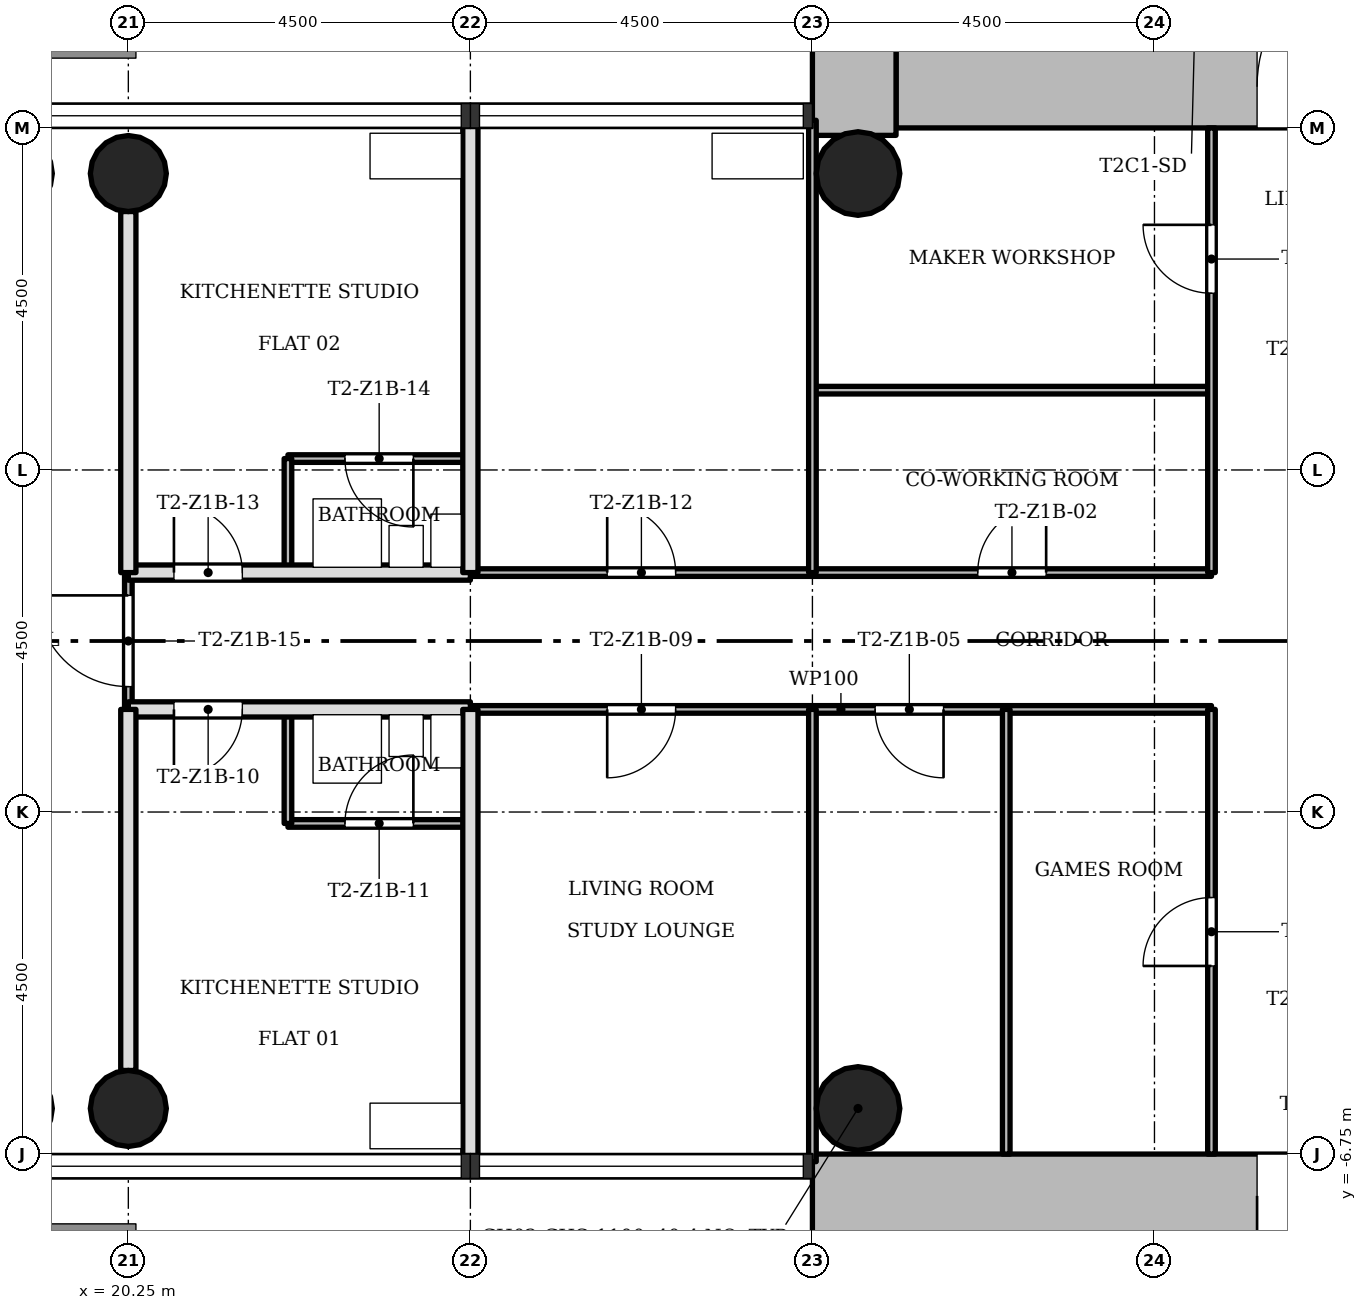
"""IFC4 building model, lengths in metres.
Left out: names, types, materials, properties, quantities, classifications, styles, units other than length and angle.
Written with IfcOpenShell. Run it as: python <this file> out.ifc"""

import sys

from ifc_helpers import new_model, si_unit, direction, frame, frame_2d, origin, origin_2d, place, context, subcontext, project, spatial, rectangle, hollow_circle, extrude, element, fill, save


model = new_model("IFC4")
c1 = context("Model", 3, precision=1e-05, world=origin(), true_north=direction((0.0, 1.0)))
c2 = subcontext(c1, "Body", "Model", "MODEL_VIEW")
j1 = project(units=[si_unit("LENGTHUNIT", "METRE"), si_unit("PLANEANGLEUNIT", "RADIAN")], contexts=[c1])
p1 = place(None, origin())
s1 = spatial("IfcSite", under=j1, at=p1, CompositionType="ELEMENT")
p2 = place(p1, origin())
s2 = spatial("IfcBuilding", under=s1, at=p2, CompositionType="ELEMENT")
p3 = place(p2, frame((0.0, 0.0, 38.1)))
s3 = spatial("IfcBuildingStorey", under=s2, at=p3, CompositionType="ELEMENT", Elevation=38.1)
p4 = place(p3, frame((30.35, 7.3, 0.0), z_axis=(0.0, 0.0, 1.0), x_axis=(1.0, 0.0, 0.0)))
e1 = element("IfcWall", 1, at=p4, inside=s3, PredefinedType="SHEAR", context=c2, shape_type="SweptSolid", body=[
    extrude(rectangle(XDim=12.4, YDim=1.1, at=frame_2d((6.2, 0.0))), origin(), (0.0, 0.0, 1.0), 3.4),
])
p5 = place(p4, frame((4.75, 0.0, 0.0)))
e2 = element("IfcOpeningElement", 2, at=p5, cuts=e1, PredefinedType="OPENING", context=c2, shape_type="SweptSolid", body=[
    extrude(rectangle(XDim=1.8, YDim=2.1, at=frame_2d((0.9, 1.05))), frame((0.0, 0.56, 0.0), z_axis=(0.0, -1.0, 0.0), x_axis=(1.0, 0.0, 0.0)), (0.0, 0.0, 1.0), 1.12),
])
p6 = place(p3, frame((29.8, 15.248, 0.0), z_axis=(0.0, 0.0, 1.0), x_axis=(0.0, -1.0, 0.0)))
e3 = element("IfcWall", 3, at=p6, inside=s3, PredefinedType="SHEAR", context=c2, shape_type="SweptSolid", body=[
    extrude(rectangle(XDim=8.596, YDim=1.1, at=frame_2d((4.298, 0.0))), origin(), (0.0, 0.0, 1.0), 3.4),
])
p7 = place(p3, frame((41.65, -7.3, 0.0), z_axis=(0.0, 0.0, 1.0), x_axis=(-1.0, 0.0, 0.0)))
e4 = element("IfcWall", 4, at=p7, inside=s3, PredefinedType="SHEAR", context=c2, shape_type="SweptSolid", body=[
    extrude(rectangle(XDim=12.4, YDim=1.1, at=frame_2d((6.2, 0.0))), origin(), (0.0, 0.0, 1.0), 3.4),
])
p8 = place(p7, frame((4.75, 0.0, 0.0)))
e5 = element("IfcOpeningElement", 5, at=p8, cuts=e4, PredefinedType="OPENING", context=c2, shape_type="SweptSolid", body=[
    extrude(rectangle(XDim=1.8, YDim=2.1, at=frame_2d((0.9, 1.05))), frame((0.0, 0.56, 0.0), z_axis=(0.0, -1.0, 0.0), x_axis=(1.0, 0.0, 0.0)), (0.0, 0.0, 1.0), 1.12),
])
for number, where, z_axis, x_axis in (
    (6, (20.25, 6.15, 0.0), (0.0, 0.0, 1.0), (1.0, 0.0, 0.0)),
    (7, (20.25, -6.15, 0.0), (0.0, 0.0, 1.0), (1.0, 0.0, 0.0)),
):
    element("IfcColumn", number, at=place(p3, frame(where, z_axis=z_axis, x_axis=x_axis)), inside=s3, PredefinedType="COLUMN", context=c2, shape_type="SweptSolid", body=[
        extrude(hollow_circle(Radius=0.5, WallThickness=0.036, at=origin_2d()), origin(), (0.0, 0.0, 1.0), 3.4),
    ])
for number, where, z_axis, x_axis in (
    (8, (29.85, 6.15, 0.0), (0.0, 0.0, 1.0), (1.0, 0.0, 0.0)),
    (9, (29.85, -6.15, 0.0), (0.0, 0.0, 1.0), (1.0, 0.0, 0.0)),
):
    element("IfcColumn", number, at=place(p3, frame(where, z_axis=z_axis, x_axis=x_axis)), inside=s3, PredefinedType="COLUMN", context=c2, shape_type="SweptSolid", body=[
        extrude(hollow_circle(Radius=0.55, WallThickness=0.04, at=origin_2d()), origin(), (0.0, 0.0, 1.0), 3.4),
    ])
p9 = place(p3, frame((24.75, -2.4, 0.0), z_axis=(0.0, 0.0, 1.0), x_axis=(-1.0, 0.0, 0.0)))
e10 = element("IfcWall", 10, at=p9, inside=s3, PredefinedType="PARTITIONING", context=c2, shape_type="SweptSolid", body=[
    extrude(rectangle(XDim=2.4, YDim=0.1, at=frame_2d((1.2, 0.0))), origin(), (0.0, 0.0, 1.0), 3.0),
])
p10 = place(p9, frame((0.75, 0.0, 0.0)))
e11 = element("IfcOpeningElement", 11, at=p10, cuts=e10, PredefinedType="OPENING", context=c2, shape_type="SweptSolid", body=[
    extrude(rectangle(XDim=0.9, YDim=2.1, at=frame_2d((0.45, 1.05))), frame((0.0, 0.06, 0.0), z_axis=(0.0, -1.0, 0.0), x_axis=(1.0, 0.0, 0.0)), (0.0, 0.0, 1.0), 0.12),
])
p11 = place(p3, frame((34.5, -0.9, 0.0), z_axis=(0.0, 0.0, 1.0), x_axis=(-1.0, 0.0, 0.0)))
e12 = element("IfcWall", 12, at=p11, inside=s3, PredefinedType="PARTITIONING", context=c2, shape_type="SweptSolid", body=[
    extrude(rectangle(XDim=9.75, YDim=0.1, at=frame_2d((4.875, 0.0))), origin(), (0.0, 0.0, 1.0), 3.0),
])
p12 = place(p11, frame((3.525, 0.0, 0.0)))
e13 = element("IfcOpeningElement", 13, at=p12, cuts=e12, PredefinedType="OPENING", context=c2, shape_type="SweptSolid", body=[
    extrude(rectangle(XDim=0.9, YDim=2.1, at=frame_2d((0.45, 1.05))), frame((0.0, 0.06, 0.0), z_axis=(0.0, -1.0, 0.0), x_axis=(1.0, 0.0, 0.0)), (0.0, 0.0, 1.0), 0.12),
])
p13 = place(p11, frame((7.05, 0.0, 0.0)))
e14 = element("IfcOpeningElement", 14, at=p13, cuts=e12, PredefinedType="OPENING", context=c2, shape_type="SweptSolid", body=[
    extrude(rectangle(XDim=0.9, YDim=2.1, at=frame_2d((0.45, 1.05))), frame((0.0, 0.06, 0.0), z_axis=(0.0, -1.0, 0.0), x_axis=(1.0, 0.0, 0.0)), (0.0, 0.0, 1.0), 0.12),
])
p14 = place(p3, frame((24.75, -0.9, 0.0), z_axis=(0.0, 0.0, 1.0), x_axis=(-1.0, 0.0, 0.0)))
e15 = element("IfcWall", 15, at=p14, inside=s3, PredefinedType="SOLIDWALL", context=c2, shape_type="SweptSolid", body=[
    extrude(rectangle(XDim=4.5, YDim=0.2, at=frame_2d((2.25, 0.0))), origin(), (0.0, 0.0, 1.0), 3.0),
])
p15 = place(p14, frame((3.0, 0.0, 0.0)))
e16 = element("IfcOpeningElement", 16, at=p15, cuts=e15, PredefinedType="OPENING", context=c2, shape_type="SweptSolid", body=[
    extrude(rectangle(XDim=0.9, YDim=2.1, at=frame_2d((0.45, 1.05))), frame((0.0, 0.11, 0.0), z_axis=(0.0, -1.0, 0.0), x_axis=(1.0, 0.0, 0.0)), (0.0, 0.0, 1.0), 0.22),
])
p16 = place(p3, frame((34.5, 0.9, 0.0), z_axis=(0.0, 0.0, 1.0), x_axis=(-1.0, 0.0, 0.0)))
e17 = element("IfcWall", 17, at=p16, inside=s3, PredefinedType="PARTITIONING", context=c2, shape_type="SweptSolid", body=[
    extrude(rectangle(XDim=9.75, YDim=0.1, at=frame_2d((4.875, 0.0))), origin(), (0.0, 0.0, 1.0), 3.0),
])
p17 = place(p16, frame((2.175, 0.0, 0.0)))
e18 = element("IfcOpeningElement", 18, at=p17, cuts=e17, PredefinedType="OPENING", context=c2, shape_type="SweptSolid", body=[
    extrude(rectangle(XDim=0.9, YDim=2.1, at=frame_2d((0.45, 1.05))), frame((0.0, 0.06, 0.0), z_axis=(0.0, -1.0, 0.0), x_axis=(1.0, 0.0, 0.0)), (0.0, 0.0, 1.0), 0.12),
])
p18 = place(p16, frame((7.05, 0.0, 0.0)))
e19 = element("IfcOpeningElement", 19, at=p18, cuts=e17, PredefinedType="OPENING", context=c2, shape_type="SweptSolid", body=[
    extrude(rectangle(XDim=0.9, YDim=2.1, at=frame_2d((0.45, 1.05))), frame((0.0, 0.06, 0.0), z_axis=(0.0, -1.0, 0.0), x_axis=(1.0, 0.0, 0.0)), (0.0, 0.0, 1.0), 0.12),
])
p19 = place(p3, frame((24.75, 0.9, 0.0), z_axis=(0.0, 0.0, 1.0), x_axis=(-1.0, 0.0, 0.0)))
e20 = element("IfcWall", 20, at=p19, inside=s3, PredefinedType="SOLIDWALL", context=c2, shape_type="SweptSolid", body=[
    extrude(rectangle(XDim=4.5, YDim=0.2, at=frame_2d((2.25, 0.0))), origin(), (0.0, 0.0, 1.0), 3.0),
])
p20 = place(p19, frame((3.0, 0.0, 0.0)))
e21 = element("IfcOpeningElement", 21, at=p20, cuts=e20, PredefinedType="OPENING", context=c2, shape_type="SweptSolid", body=[
    extrude(rectangle(XDim=0.9, YDim=2.1, at=frame_2d((0.45, 1.05))), frame((0.0, 0.11, 0.0), z_axis=(0.0, -1.0, 0.0), x_axis=(1.0, 0.0, 0.0)), (0.0, 0.0, 1.0), 0.22),
])
p21 = place(p3, frame((24.75, 2.4, 0.0), z_axis=(0.0, 0.0, 1.0), x_axis=(-1.0, 0.0, 0.0)))
e22 = element("IfcWall", 22, at=p21, inside=s3, PredefinedType="PARTITIONING", context=c2, shape_type="SweptSolid", body=[
    extrude(rectangle(XDim=2.4, YDim=0.1, at=frame_2d((1.2, 0.0))), origin(), (0.0, 0.0, 1.0), 3.0),
])
p22 = place(p21, frame((0.75, 0.0, 0.0)))
e23 = element("IfcOpeningElement", 23, at=p22, cuts=e22, PredefinedType="OPENING", context=c2, shape_type="SweptSolid", body=[
    extrude(rectangle(XDim=0.9, YDim=2.1, at=frame_2d((0.45, 1.05))), frame((0.0, 0.06, 0.0), z_axis=(0.0, -1.0, 0.0), x_axis=(1.0, 0.0, 0.0)), (0.0, 0.0, 1.0), 0.12),
])
p23 = place(p3, frame((34.5, 3.3, 0.0), z_axis=(0.0, 0.0, 1.0), x_axis=(-1.0, 0.0, 0.0)))
e24 = element("IfcWall", 24, at=p23, inside=s3, PredefinedType="PARTITIONING", context=c2, shape_type="SweptSolid", body=[
    extrude(rectangle(XDim=5.25, YDim=0.1, at=frame_2d((2.625, 0.0))), origin(), (0.0, 0.0, 1.0), 3.0),
])
p24 = place(p3, frame((34.5, -6.75, 0.0), z_axis=(0.0, 0.0, 1.0), x_axis=(0.0, 1.0, 0.0)))
e25 = element("IfcWall", 25, at=p24, inside=s3, PredefinedType="PARTITIONING", context=c2, shape_type="SweptSolid", body=[
    extrude(rectangle(XDim=5.85, YDim=0.1, at=frame_2d((2.925, 0.0))), origin(), (0.0, 0.0, 1.0), 3.0),
])
p25 = place(p24, frame((2.475, 0.0, 0.0)))
e26 = element("IfcOpeningElement", 26, at=p25, cuts=e25, PredefinedType="OPENING", context=c2, shape_type="SweptSolid", body=[
    extrude(rectangle(XDim=0.9, YDim=2.1, at=frame_2d((0.45, 1.05))), frame((0.0, 0.06, 0.0), z_axis=(0.0, -1.0, 0.0), x_axis=(1.0, 0.0, 0.0)), (0.0, 0.0, 1.0), 0.12),
])
p26 = place(p3, frame((34.5, 0.9, 0.0), z_axis=(0.0, 0.0, 1.0), x_axis=(0.0, 1.0, 0.0)))
e27 = element("IfcWall", 27, at=p26, inside=s3, PredefinedType="PARTITIONING", context=c2, shape_type="SweptSolid", body=[
    extrude(rectangle(XDim=5.85, YDim=0.1, at=frame_2d((2.925, 0.0))), origin(), (0.0, 0.0, 1.0), 3.0),
])
p27 = place(p26, frame((3.675, 0.0, 0.0)))
e28 = element("IfcOpeningElement", 28, at=p27, cuts=e27, PredefinedType="OPENING", context=c2, shape_type="SweptSolid", body=[
    extrude(rectangle(XDim=0.9, YDim=2.1, at=frame_2d((0.45, 1.05))), frame((0.0, 0.06, 0.0), z_axis=(0.0, -1.0, 0.0), x_axis=(1.0, 0.0, 0.0)), (0.0, 0.0, 1.0), 0.12),
])
p28 = place(p3, frame((31.8, -6.75, 0.0), z_axis=(0.0, 0.0, 1.0), x_axis=(0.0, 1.0, 0.0)))
e29 = element("IfcWall", 29, at=p28, inside=s3, PredefinedType="PARTITIONING", context=c2, shape_type="SweptSolid", body=[
    extrude(rectangle(XDim=5.85, YDim=0.1, at=frame_2d((2.925, 0.0))), origin(), (0.0, 0.0, 1.0), 3.0),
])
for number, where, z_axis, x_axis in (
    (30, (29.25, -6.85, 0.0), (0.0, 0.0, 1.0), (0.0, 1.0, 0.0)),
    (31, (29.25, 0.9, 0.0), (0.0, 0.0, 1.0), (0.0, 1.0, 0.0)),
):
    element("IfcWall", number, at=place(p3, frame(where, z_axis=z_axis, x_axis=x_axis)), inside=s3, PredefinedType="PARTITIONING", context=c2, shape_type="SweptSolid", body=[
        extrude(rectangle(XDim=5.95, YDim=0.1, at=frame_2d((2.975, 0.0))), origin(), (0.0, 0.0, 1.0), 3.0),
    ])
for number, where, z_axis, x_axis in (
    (32, (24.75, -6.85, 0.0), (0.0, 0.0, 1.0), (0.0, 1.0, 0.0)),
    (33, (24.75, 0.9, 0.0), (0.0, 0.0, 1.0), (0.0, 1.0, 0.0)),
):
    element("IfcWall", number, at=place(p3, frame(where, z_axis=z_axis, x_axis=x_axis)), inside=s3, PredefinedType="SOLIDWALL", context=c2, shape_type="SweptSolid", body=[
        extrude(rectangle(XDim=5.95, YDim=0.2, at=frame_2d((2.975, 0.0))), origin(), (0.0, 0.0, 1.0), 3.0),
    ])
for number, where, z_axis, x_axis in (
    (34, (22.35, -2.4, 0.0), (0.0, 0.0, 1.0), (0.0, 1.0, 0.0)),
    (35, (22.35, 0.9, 0.0), (0.0, 0.0, 1.0), (0.0, 1.0, 0.0)),
):
    element("IfcWall", number, at=place(p3, frame(where, z_axis=z_axis, x_axis=x_axis)), inside=s3, PredefinedType="PARTITIONING", context=c2, shape_type="SweptSolid", body=[
        extrude(rectangle(XDim=1.5, YDim=0.1, at=frame_2d((0.75, 0.0))), origin(), (0.0, 0.0, 1.0), 3.0),
    ])
p29 = place(p3, frame((20.25, -0.9, 0.0), z_axis=(0.0, 0.0, 1.0), x_axis=(0.0, 1.0, 0.0)))
e36 = element("IfcWall", 36, at=p29, inside=s3, PredefinedType="PARTITIONING", context=c2, shape_type="SweptSolid", body=[
    extrude(rectangle(XDim=1.8, YDim=0.1, at=frame_2d((0.9, 0.0))), origin(), (0.0, 0.0, 1.0), 3.0),
])
p30 = place(p29, frame((0.3, 0.0, 0.0)))
e37 = element("IfcOpeningElement", 37, at=p30, cuts=e36, PredefinedType="OPENING", context=c2, shape_type="SweptSolid", body=[
    extrude(rectangle(XDim=1.2, YDim=2.1, at=frame_2d((0.6, 1.05))), frame((0.0, 0.06, 0.0), z_axis=(0.0, -1.0, 0.0), x_axis=(1.0, 0.0, 0.0)), (0.0, 0.0, 1.0), 0.12),
])
for number, where, z_axis, x_axis in (
    (38, (20.25, -5.65, 0.0), (0.0, 0.0, 1.0), (0.0, 1.0, 0.0)),
    (39, (20.25, 0.9, 0.0), (0.0, 0.0, 1.0), (0.0, 1.0, 0.0)),
):
    element("IfcWall", number, at=place(p3, frame(where, z_axis=z_axis, x_axis=x_axis)), inside=s3, PredefinedType="SOLIDWALL", context=c2, shape_type="SweptSolid", body=[
        extrude(rectangle(XDim=4.75, YDim=0.2, at=frame_2d((2.375, 0.0))), origin(), (0.0, 0.0, 1.0), 3.0),
    ])
p31 = place(p17, origin())
e40 = element("IfcDoor", 40, at=p31, inside=s3, OperationType="SINGLE_SWING_LEFT", PredefinedType="DOOR", context=c2, shape_type="SweptSolid", body=[
    extrude(rectangle(XDim=0.9, YDim=2.1, at=frame_2d((0.45, 1.05))), frame((0.0, 0.025, 0.0), z_axis=(0.0, -1.0, 0.0), x_axis=(1.0, 0.0, 0.0)), (0.0, 0.0, 1.0), 0.05),
])
fill(e18, e40)
p32 = place(p27, origin())
e41 = element("IfcDoor", 41, at=p32, inside=s3, OperationType="SINGLE_SWING_LEFT", PredefinedType="DOOR", context=c2, shape_type="SweptSolid", body=[
    extrude(rectangle(XDim=0.9, YDim=2.1, at=frame_2d((0.45, 1.05))), frame((0.0, 0.025, 0.0), z_axis=(0.0, -1.0, 0.0), x_axis=(1.0, 0.0, 0.0)), (0.0, 0.0, 1.0), 0.05),
])
fill(e28, e41)
p33 = place(p25, origin())
e42 = element("IfcDoor", 42, at=p33, inside=s3, OperationType="SINGLE_SWING_RIGHT", PredefinedType="DOOR", context=c2, shape_type="SweptSolid", body=[
    extrude(rectangle(XDim=0.9, YDim=2.1, at=frame_2d((0.45, 1.05))), frame((0.0, 0.025, 0.0), z_axis=(0.0, -1.0, 0.0), x_axis=(1.0, 0.0, 0.0)), (0.0, 0.0, 1.0), 0.05),
])
fill(e26, e42)
p34 = place(p12, origin())
e43 = element("IfcDoor", 43, at=p34, inside=s3, OperationType="SINGLE_SWING_RIGHT", PredefinedType="DOOR", context=c2, shape_type="SweptSolid", body=[
    extrude(rectangle(XDim=0.9, YDim=2.1, at=frame_2d((0.45, 1.05))), frame((0.0, 0.025, 0.0), z_axis=(0.0, -1.0, 0.0), x_axis=(1.0, 0.0, 0.0)), (0.0, 0.0, 1.0), 0.05),
])
fill(e13, e43)
p35 = place(p13, origin())
e44 = element("IfcDoor", 44, at=p35, inside=s3, OperationType="SINGLE_SWING_LEFT", PredefinedType="DOOR", context=c2, shape_type="SweptSolid", body=[
    extrude(rectangle(XDim=0.9, YDim=2.1, at=frame_2d((0.45, 1.05))), frame((0.0, 0.025, 0.0), z_axis=(0.0, -1.0, 0.0), x_axis=(1.0, 0.0, 0.0)), (0.0, 0.0, 1.0), 0.05),
])
fill(e14, e44)
p36 = place(p15, origin())
e45 = element("IfcDoor", 45, at=p36, inside=s3, OperationType="SINGLE_SWING_LEFT", PredefinedType="DOOR", context=c2, shape_type="SweptSolid", body=[
    extrude(rectangle(XDim=0.9, YDim=2.1, at=frame_2d((0.45, 1.05))), frame((0.0, 0.025, 0.0), z_axis=(0.0, -1.0, 0.0), x_axis=(1.0, 0.0, 0.0)), (0.0, 0.0, 1.0), 0.05),
])
fill(e16, e45)
p37 = place(p10, origin())
e46 = element("IfcDoor", 46, at=p37, inside=s3, OperationType="SINGLE_SWING_LEFT", PredefinedType="DOOR", context=c2, shape_type="SweptSolid", body=[
    extrude(rectangle(XDim=0.9, YDim=2.1, at=frame_2d((0.45, 1.05))), frame((0.0, 0.025, 0.0), z_axis=(0.0, -1.0, 0.0), x_axis=(1.0, 0.0, 0.0)), (0.0, 0.0, 1.0), 0.05),
])
fill(e11, e46)
p38 = place(p18, origin())
e47 = element("IfcDoor", 47, at=p38, inside=s3, OperationType="SINGLE_SWING_RIGHT", PredefinedType="DOOR", context=c2, shape_type="SweptSolid", body=[
    extrude(rectangle(XDim=0.9, YDim=2.1, at=frame_2d((0.45, 1.05))), frame((0.0, 0.025, 0.0), z_axis=(0.0, -1.0, 0.0), x_axis=(1.0, 0.0, 0.0)), (0.0, 0.0, 1.0), 0.05),
])
fill(e19, e47)
p39 = place(p20, origin())
e48 = element("IfcDoor", 48, at=p39, inside=s3, OperationType="SINGLE_SWING_RIGHT", PredefinedType="DOOR", context=c2, shape_type="SweptSolid", body=[
    extrude(rectangle(XDim=0.9, YDim=2.1, at=frame_2d((0.45, 1.05))), frame((0.0, 0.025, 0.0), z_axis=(0.0, -1.0, 0.0), x_axis=(1.0, 0.0, 0.0)), (0.0, 0.0, 1.0), 0.05),
])
fill(e21, e48)
p40 = place(p22, origin())
e49 = element("IfcDoor", 49, at=p40, inside=s3, OperationType="SINGLE_SWING_RIGHT", PredefinedType="DOOR", context=c2, shape_type="SweptSolid", body=[
    extrude(rectangle(XDim=0.9, YDim=2.1, at=frame_2d((0.45, 1.05))), frame((0.0, 0.025, 0.0), z_axis=(0.0, -1.0, 0.0), x_axis=(1.0, 0.0, 0.0)), (0.0, 0.0, 1.0), 0.05),
])
fill(e23, e49)
p41 = place(p30, origin())
e50 = element("IfcDoor", 50, at=p41, inside=s3, OperationType="SINGLE_SWING_LEFT", PredefinedType="DOOR", context=c2, shape_type="SweptSolid", body=[
    extrude(rectangle(XDim=1.2, YDim=2.1, at=frame_2d((0.6, 1.05))), frame((0.0, 0.025, 0.0), z_axis=(0.0, -1.0, 0.0), x_axis=(1.0, 0.0, 0.0)), (0.0, 0.0, 1.0), 0.05),
])
fill(e37, e50)
p42 = place(p5, origin())
e51 = element("IfcDoor", 51, at=p42, inside=s3, OperationType="SINGLE_SWING_LEFT", PredefinedType="DOOR", context=c2, shape_type="SweptSolid", body=[
    extrude(rectangle(XDim=1.8, YDim=2.1, at=frame_2d((0.9, 1.05))), frame((0.0, 0.025, 0.0), z_axis=(0.0, -1.0, 0.0), x_axis=(1.0, 0.0, 0.0)), (0.0, 0.0, 1.0), 0.05),
])
fill(e2, e51)
p43 = place(p8, origin())
e52 = element("IfcDoor", 52, at=p43, inside=s3, OperationType="SINGLE_SWING_LEFT", PredefinedType="DOOR", context=c2, shape_type="SweptSolid", body=[
    extrude(rectangle(XDim=1.8, YDim=2.1, at=frame_2d((0.9, 1.05))), frame((0.0, 0.025, 0.0), z_axis=(0.0, -1.0, 0.0), x_axis=(1.0, 0.0, 0.0)), (0.0, 0.0, 1.0), 0.05),
])
fill(e5, e52)
save(model, sys.argv[1])
